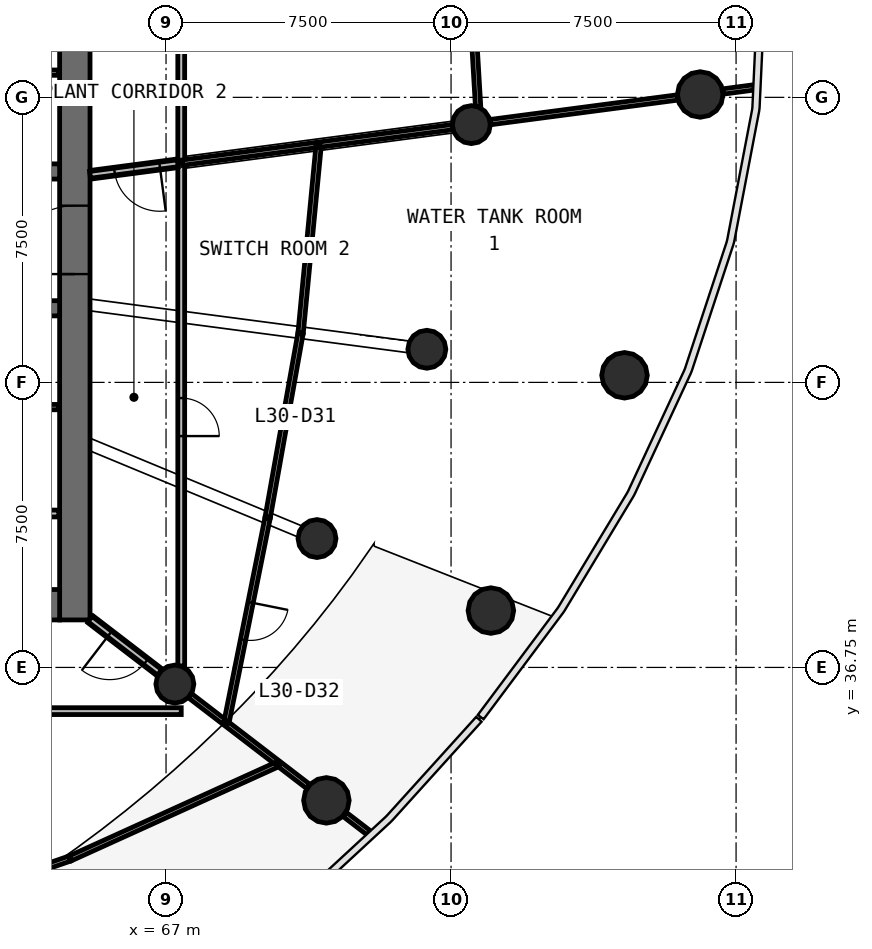
"""IFC4 building model, lengths in metres.
Left out: names, types, materials, properties, quantities, classifications, styles, units other than length and angle.
Written with IfcOpenShell. Run it as: python <this file> out.ifc"""

import sys

from ifc_helpers import new_model, si_unit, direction, frame, frame_2d, origin, origin_2d, place, context, subcontext, project, spatial, rectangle, circle, extrude, source, transform, mapped, element, fill, save


model = new_model("IFC4")
c1 = context("Model", 3, precision=1e-05, world=origin(), true_north=direction((0.0, 1.0)))
c2 = subcontext(c1, "Body", "Model", "MODEL_VIEW")
j1 = project(units=[si_unit("LENGTHUNIT", "METRE"), si_unit("PLANEANGLEUNIT", "RADIAN")], contexts=[c1])
p1 = place(None, origin())
s1 = spatial("IfcSite", under=j1, at=p1, CompositionType="ELEMENT")
p2 = place(p1, origin())
s2 = spatial("IfcBuilding", under=s1, at=p2, CompositionType="ELEMENT")
p3 = place(p2, frame((0.0, 0.0, 129.0)))
s3 = spatial("IfcBuildingStorey", under=s2, at=p3, CompositionType="ELEMENT", Elevation=129.0)
p4 = place(p3, frame((64.6, 38.0, 0.0), z_axis=(0.0, 0.0, 1.0), x_axis=(0.0, 1.0, 0.0)))
e1 = element("IfcWall", 1, at=p4, inside=s3, PredefinedType="SHEAR", context=c2, shape_type="SweptSolid", body=[
    extrude(rectangle(XDim=20.0, YDim=0.8, at=frame_2d((10.0, 0.0))), origin(), (0.0, 0.0, 1.0), 4.1),
])
p5 = place(p4, frame((9.1, 0.0, 0.0)))
e2 = element("IfcOpeningElement", 2, at=p5, cuts=e1, PredefinedType="OPENING", context=c2, shape_type="SweptSolid", body=[
    extrude(rectangle(XDim=1.8, YDim=2.1, at=frame_2d((0.9, 1.05))), frame((0.0, 0.41, 0.0), z_axis=(0.0, -1.0, 0.0), x_axis=(1.0, 0.0, 0.0)), (0.0, 0.0, 1.0), 0.82),
])
p6 = place(p3, frame((39.8, 38.4, 0.0), z_axis=(0.0, 0.0, 1.0), x_axis=(1.0, 0.0, 0.0)))
e3 = element("IfcWall", 3, at=p6, inside=s3, PredefinedType="SHEAR", context=c2, shape_type="SweptSolid", body=[
    extrude(rectangle(XDim=24.4, YDim=0.8, at=frame_2d((12.2, 0.0))), origin(), (0.0, 0.0, 1.0), 4.1),
])
p7 = place(p6, frame((21.65, 0.0, 0.0)))
e4 = element("IfcOpeningElement", 4, at=p7, cuts=e3, PredefinedType="OPENING", context=c2, shape_type="SweptSolid", body=[
    extrude(rectangle(XDim=1.1, YDim=2.1, at=frame_2d((0.55, 1.05))), frame((0.0, 0.41, 0.0), z_axis=(0.0, -1.0, 0.0), x_axis=(1.0, 0.0, 0.0)), (0.0, 0.0, 1.0), 0.82),
])
p8 = place(p6, frame((2.15, 0.0, 0.0)))
e5 = element("IfcOpeningElement", 5, at=p8, cuts=e3, PredefinedType="OPENING", context=c2, shape_type="SweptSolid", body=[
    extrude(rectangle(XDim=1.1, YDim=2.1, at=frame_2d((0.55, 1.05))), frame((0.0, 0.41, 0.0), z_axis=(0.0, -1.0, 0.0), x_axis=(1.0, 0.0, 0.0)), (0.0, 0.0, 1.0), 0.82),
])
p9 = place(p3, frame((39.8, 49.8, 0.0), z_axis=(0.0, 0.0, 1.0), x_axis=(1.0, 0.0, 0.0)))
e6 = element("IfcWall", 6, at=p9, inside=s3, PredefinedType="SHEAR", context=c2, shape_type="SweptSolid", body=[
    extrude(rectangle(XDim=24.4, YDim=0.4, at=frame_2d((12.2, 0.0))), origin(), (0.0, 0.0, 1.0), 4.1),
])
p10 = place(p9, frame((1.1, 0.0, 0.0)))
e7 = element("IfcOpeningElement", 7, at=p10, cuts=e6, PredefinedType="OPENING", context=c2, shape_type="SweptSolid", body=[
    extrude(rectangle(XDim=1.8, YDim=2.4, at=frame_2d((0.9, 1.2))), frame((0.0, 0.21, 0.0), z_axis=(0.0, -1.0, 0.0), x_axis=(1.0, 0.0, 0.0)), (0.0, 0.0, 1.0), 0.42),
])
p11 = place(p9, frame((20.65, 0.0, 0.0)))
e8 = element("IfcOpeningElement", 8, at=p11, cuts=e6, PredefinedType="OPENING", context=c2, shape_type="SweptSolid", body=[
    extrude(rectangle(XDim=0.9, YDim=2.1, at=frame_2d((0.45, 1.05))), frame((0.0, 0.21, 0.0), z_axis=(0.0, -1.0, 0.0), x_axis=(1.0, 0.0, 0.0)), (0.0, 0.0, 1.0), 0.42),
])
p12 = place(p9, frame((11.85, 0.0, 0.0)))
e9 = element("IfcOpeningElement", 9, at=p12, cuts=e6, PredefinedType="OPENING", context=c2, shape_type="SweptSolid", body=[
    extrude(rectangle(XDim=0.9, YDim=2.1, at=frame_2d((0.45, 1.05))), frame((0.0, 0.21, 0.0), z_axis=(0.0, -1.0, 0.0), x_axis=(1.0, 0.0, 0.0)), (0.0, 0.0, 1.0), 0.42),
])
p13 = place(p3, frame((39.8, 46.2, 0.0), z_axis=(0.0, 0.0, 1.0), x_axis=(1.0, 0.0, 0.0)))
e10 = element("IfcWall", 10, at=p13, inside=s3, PredefinedType="SHEAR", context=c2, shape_type="SweptSolid", body=[
    extrude(rectangle(XDim=24.4, YDim=0.4, at=frame_2d((12.2, 0.0))), origin(), (0.0, 0.0, 1.0), 4.1),
])
p14 = place(p13, frame((20.65, 0.0, 0.0)))
e11 = element("IfcOpeningElement", 11, at=p14, cuts=e10, PredefinedType="OPENING", context=c2, shape_type="SweptSolid", body=[
    extrude(rectangle(XDim=0.9, YDim=2.1, at=frame_2d((0.45, 1.05))), frame((0.0, 0.21, 0.0), z_axis=(0.0, -1.0, 0.0), x_axis=(1.0, 0.0, 0.0)), (0.0, 0.0, 1.0), 0.42),
])
p15 = place(p13, frame((22.65, 0.0, 0.0)))
e12 = element("IfcOpeningElement", 12, at=p15, cuts=e10, PredefinedType="OPENING", context=c2, shape_type="SweptSolid", body=[
    extrude(rectangle(XDim=0.9, YDim=2.1, at=frame_2d((0.45, 1.05))), frame((0.0, 0.21, 0.0), z_axis=(0.0, -1.0, 0.0), x_axis=(1.0, 0.0, 0.0)), (0.0, 0.0, 1.0), 0.42),
])
p16 = place(p13, frame((0.85, 0.0, 0.0)))
e13 = element("IfcOpeningElement", 13, at=p16, cuts=e10, PredefinedType="OPENING", context=c2, shape_type="SweptSolid", body=[
    extrude(rectangle(XDim=0.9, YDim=2.1, at=frame_2d((0.45, 1.05))), frame((0.0, 0.21, 0.0), z_axis=(0.0, -1.0, 0.0), x_axis=(1.0, 0.0, 0.0)), (0.0, 0.0, 1.0), 0.42),
])
p17 = place(p13, frame((2.85, 0.0, 0.0)))
e14 = element("IfcOpeningElement", 14, at=p17, cuts=e10, PredefinedType="OPENING", context=c2, shape_type="SweptSolid", body=[
    extrude(rectangle(XDim=0.9, YDim=2.1, at=frame_2d((0.45, 1.05))), frame((0.0, 0.21, 0.0), z_axis=(0.0, -1.0, 0.0), x_axis=(1.0, 0.0, 0.0)), (0.0, 0.0, 1.0), 0.42),
])
p18 = place(p13, frame((11.85, 0.0, 0.0)))
e15 = element("IfcOpeningElement", 15, at=p18, cuts=e10, PredefinedType="OPENING", context=c2, shape_type="SweptSolid", body=[
    extrude(rectangle(XDim=0.9, YDim=2.1, at=frame_2d((0.45, 1.05))), frame((0.0, 0.21, 0.0), z_axis=(0.0, -1.0, 0.0), x_axis=(1.0, 0.0, 0.0)), (0.0, 0.0, 1.0), 0.42),
])
m1 = source(origin(), c2, "Body", "SweptSolid", [
    extrude(circle(Radius=0.6, at=origin_2d()), origin(), (0.0, 0.0, 1.0), 3.78),
])
for number, where, z_axis, x_axis in (
    (16, (81.056, 51.825, 0.0), (0.0, 0.0, 1.0), (1.0, 0.0, 0.0)),
    (17, (71.22, 33.252, 0.0), (0.0, 0.0, 1.0), (1.0, 0.0, 0.0)),
    (18, (75.548, 38.246, 0.0), (0.0, 0.0, 1.0), (1.0, 0.0, 0.0)),
    (19, (79.064, 44.437, 0.0), (0.0, 0.0, 1.0), (1.0, 0.0, 0.0)),
):
    element("IfcColumn", number, at=place(p3, frame(where, z_axis=z_axis, x_axis=x_axis)), inside=s3, PredefinedType="COLUMN", context=c2, shape_type="MappedRepresentation", body=[
        mapped(m1, transform((0.0, 0.0, 0.0), scale=1.0)),
    ])
m2 = source(origin(), c2, "Body", "SweptSolid", [
    extrude(circle(Radius=0.5, at=origin_2d()), origin(), (0.0, 0.0, 1.0), 3.78),
])
for number, where, z_axis, x_axis in (
    (20, (75.034, 51.032, 0.0), (0.0, 0.0, 1.0), (1.0, 0.0, 0.0)),
    (21, (67.232, 36.312, 0.0), (0.0, 0.0, 1.0), (1.0, 0.0, 0.0)),
    (22, (70.972, 40.141, 0.0), (0.0, 0.0, 1.0), (1.0, 0.0, 0.0)),
    (23, (73.863, 45.122, 0.0), (0.0, 0.0, 1.0), (1.0, 0.0, 0.0)),
):
    element("IfcColumn", number, at=place(p3, frame(where, z_axis=z_axis, x_axis=x_axis)), inside=s3, PredefinedType="COLUMN", context=c2, shape_type="MappedRepresentation", body=[
        mapped(m2, transform((0.0, 0.0, 0.0), scale=1.0)),
    ])
p19 = place(p3, frame((67.4, 35.6, 0.0), z_axis=(0.0, 0.0, 1.0), x_axis=(-1.0, 0.0, 0.0)))
e24 = element("IfcWall", 24, at=p19, inside=s3, PredefinedType="PARTITIONING", context=c2, shape_type="SweptSolid", body=[
    extrude(rectangle(XDim=13.767, YDim=0.18, at=frame_2d((6.884, 0.0))), origin(), (0.0, 0.0, 1.0), 2.58),
])
p20 = place(p19, frame((6.317, 0.0, 0.0)))
e25 = element("IfcOpeningElement", 25, at=p20, cuts=e24, PredefinedType="OPENING", context=c2, shape_type="SweptSolid", body=[
    extrude(rectangle(XDim=1.0, YDim=2.1, at=frame_2d((0.5, 1.05))), frame((0.0, 0.1, 0.0), z_axis=(0.0, -1.0, 0.0), x_axis=(1.0, 0.0, 0.0)), (0.0, 0.0, 1.0), 0.2),
])
p21 = place(p3, frame((67.4, 50.027, 0.0), z_axis=(0.0, 0.0, 1.0), x_axis=(0.0, -1.0, 0.0)))
e26 = element("IfcWall", 26, at=p21, inside=s3, PredefinedType="PARTITIONING", context=c2, shape_type="SweptSolid", body=[
    extrude(rectangle(XDim=13.24, YDim=0.18, at=frame_2d((6.62, 0.0))), origin(), (0.0, 0.0, 1.0), 2.58),
])
p22 = place(p21, frame((6.19, 0.0, 0.0)))
e27 = element("IfcOpeningElement", 27, at=p22, cuts=e26, PredefinedType="OPENING", context=c2, shape_type="SweptSolid", body=[
    extrude(rectangle(XDim=1.0, YDim=2.1, at=frame_2d((0.5, 1.05))), frame((0.0, 0.1, 0.0), z_axis=(0.0, -1.0, 0.0), x_axis=(1.0, 0.0, 0.0)), (0.0, 0.0, 1.0), 0.2),
])
p23 = place(p3, frame((67.4, 60.4, 0.0), z_axis=(0.0, 0.0, 1.0), x_axis=(0.0, -1.0, 0.0)))
e28 = element("IfcWall", 28, at=p23, inside=s3, PredefinedType="PARTITIONING", context=c2, shape_type="SweptSolid", body=[
    extrude(rectangle(XDim=10.343, YDim=0.18, at=frame_2d((5.171, 0.0))), origin(), (0.0, 0.0, 1.0), 2.58),
])
p24 = place(p23, frame((4.693, 0.0, 0.0)))
e29 = element("IfcOpeningElement", 29, at=p24, cuts=e28, PredefinedType="OPENING", context=c2, shape_type="SweptSolid", body=[
    extrude(rectangle(XDim=1.0, YDim=2.1, at=frame_2d((0.5, 1.05))), frame((0.0, 0.1, 0.0), z_axis=(0.0, -1.0, 0.0), x_axis=(1.0, 0.0, 0.0)), (0.0, 0.0, 1.0), 0.2),
])
p25 = place(p3, frame((60.23, 40.8, 0.0), z_axis=(0.0, 0.0, 1.0), x_axis=(1.0, 0.0, 0.0)))
e30 = element("IfcWall", 30, at=p25, inside=s3, PredefinedType="PARTITIONING", context=c2, shape_type="SweptSolid", body=[
    extrude(rectangle(XDim=3.95, YDim=0.18, at=frame_2d((1.975, 0.0))), origin(), (0.0, 0.0, 1.0), 3.78),
])
p26 = place(p25, frame((1.6, 0.0, 0.0)))
e31 = element("IfcOpeningElement", 31, at=p26, cuts=e30, PredefinedType="OPENING", context=c2, shape_type="SweptSolid", body=[
    extrude(rectangle(XDim=0.9, YDim=2.1, at=frame_2d((0.45, 1.05))), frame((0.0, 0.1, 0.0), z_axis=(0.0, -1.0, 0.0), x_axis=(1.0, 0.0, 0.0)), (0.0, 0.0, 1.0), 0.2),
])
p27 = place(p3, frame((67.31, 50.016, 0.0), z_axis=(0.0, 0.0, 1.0), x_axis=(-0.991440737811, -0.130557509967, 0.0)))
e32 = element("IfcWall", 32, at=p27, inside=s3, PredefinedType="PARTITIONING", context=c2, shape_type="SweptSolid", body=[
    extrude(rectangle(XDim=2.33, YDim=0.18, at=frame_2d((1.165, 0.0))), origin(), (0.0, 0.0, 1.0), 2.58),
])
p28 = place(p27, frame((0.48, 0.0, 0.0)))
e33 = element("IfcOpeningElement", 33, at=p28, cuts=e32, PredefinedType="OPENING", context=c2, shape_type="SweptSolid", body=[
    extrude(rectangle(XDim=1.2, YDim=2.1, at=frame_2d((0.6, 1.05))), frame((0.0, 0.1, 0.0), z_axis=(0.0, -1.0, 0.0), x_axis=(1.0, 0.0, 0.0)), (0.0, 0.0, 1.0), 0.2),
])
p29 = place(p3, frame((66.832, 36.619, 0.0), z_axis=(0.0, 0.0, 1.0), x_axis=(-0.793393624489, 0.608708926023, 0.0)))
e34 = element("IfcWall", 34, at=p29, inside=s3, PredefinedType="PARTITIONING", context=c2, shape_type="SweptSolid", body=[
    extrude(rectangle(XDim=2.309, YDim=0.18, at=frame_2d((1.155, 0.0))), origin(), (0.0, 0.0, 1.0), 2.58),
])
p30 = place(p29, frame((0.459, 0.0, 0.0)))
e35 = element("IfcOpeningElement", 35, at=p30, cuts=e34, PredefinedType="OPENING", context=c2, shape_type="SweptSolid", body=[
    extrude(rectangle(XDim=1.2, YDim=2.1, at=frame_2d((0.6, 1.05))), frame((0.0, 0.1, 0.0), z_axis=(0.0, -1.0, 0.0), x_axis=(1.0, 0.0, 0.0)), (0.0, 0.0, 1.0), 0.2),
])
p31 = place(p3, frame((64.486, 31.728, 0.0), z_axis=(0.0, 0.0, 1.0), x_axis=(0.910630285698, 0.413222074397, 0.0)))
e36 = element("IfcWall", 36, at=p31, inside=s3, PredefinedType="PARTITIONING", context=c2, shape_type="SweptSolid", body=[
    extrude(rectangle(XDim=6.018, YDim=0.14, at=frame_2d((3.009, 0.0))), origin(), (0.0, 0.0, 1.0), 2.58),
])
p32 = place(p3, frame((74.862, 57.439, 0.0), z_axis=(0.0, 0.0, 1.0), x_axis=(0.058847201185, -0.998267001815, 0.0)))
e37 = element("IfcWall", 37, at=p32, inside=s3, PredefinedType="PARTITIONING", context=c2, shape_type="SweptSolid", body=[
    extrude(rectangle(XDim=5.945, YDim=0.14, at=frame_2d((2.973, 0.0))), origin(), (0.0, 0.0, 1.0), 2.58),
])
p33 = place(p32, frame((2.495, 0.0, 0.0)))
e38 = element("IfcOpeningElement", 38, at=p33, cuts=e37, PredefinedType="OPENING", context=c2, shape_type="SweptSolid", body=[
    extrude(rectangle(XDim=1.0, YDim=2.1, at=frame_2d((0.5, 1.05))), frame((0.0, 0.08, 0.0), z_axis=(0.0, -1.0, 0.0), x_axis=(1.0, 0.0, 0.0)), (0.0, 0.0, 1.0), 0.16),
])
p34 = place(p3, frame((69.672, 40.68, 0.0), z_axis=(0.0, 0.0, 1.0), x_axis=(-0.197248441668, -0.980353534323, 0.0)))
e39 = element("IfcWall", 39, at=p34, inside=s3, PredefinedType="PARTITIONING", context=c2, shape_type="SweptSolid", body=[
    extrude(rectangle(XDim=5.514, YDim=0.14, at=frame_2d((2.757, 0.0))), origin(), (0.0, 0.0, 1.0), 2.58),
])
p35 = place(p34, frame((2.264, 0.0, 0.0)))
e40 = element("IfcOpeningElement", 40, at=p35, cuts=e39, PredefinedType="OPENING", context=c2, shape_type="SweptSolid", body=[
    extrude(rectangle(XDim=1.0, YDim=2.1, at=frame_2d((0.5, 1.05))), frame((0.0, 0.08, 0.0), z_axis=(0.0, -1.0, 0.0), x_axis=(1.0, 0.0, 0.0)), (0.0, 0.0, 1.0), 0.16),
])
p36 = place(p3, frame((59.46, 29.99, 0.0), z_axis=(0.0, 0.0, 1.0), x_axis=(0.945116087861, 0.326734724918, 0.0)))
e41 = element("IfcWall", 41, at=p36, inside=s3, PredefinedType="PARTITIONING", context=c2, shape_type="SweptSolid", body=[
    extrude(rectangle(XDim=5.288, YDim=0.14, at=frame_2d((2.644, 0.0))), origin(), (0.0, 0.0, 1.0), 2.58),
])
p37 = place(p3, frame((70.542, 45.559, 0.0), z_axis=(0.0, 0.0, 1.0), x_axis=(0.095688058523, 0.995411369965, 0.0)))
e42 = element("IfcWall", 42, at=p37, inside=s3, PredefinedType="PARTITIONING", context=c2, shape_type="SweptSolid", body=[
    extrude(rectangle(XDim=4.968, YDim=0.14, at=frame_2d((2.484, 0.0))), origin(), (0.0, 0.0, 1.0), 2.58),
])
p38 = place(p3, frame((75.534, 51.098, 0.0), z_axis=(0.0, 0.0, 1.0), x_axis=(0.991443414541, 0.130537181533, 0.0)))
e43 = element("IfcWall", 43, at=p38, inside=s3, PredefinedType="PARTITIONING", context=c2, shape_type="SweptSolid", body=[
    extrude(rectangle(XDim=4.966, YDim=0.14, at=frame_2d((2.483, 0.0))), origin(), (0.0, 0.0, 1.0), 2.58),
])
p39 = place(p3, frame((69.677, 40.71, 0.0), z_axis=(0.0, 0.0, 1.0), x_axis=(0.175685353507, 0.984446370588, 0.0)))
e44 = element("IfcWall", 44, at=p39, inside=s3, PredefinedType="PARTITIONING", context=c2, shape_type="SweptSolid", body=[
    extrude(rectangle(XDim=4.896, YDim=0.14, at=frame_2d((2.448, 0.0))), origin(), (0.0, 0.0, 1.0), 2.58),
])
p40 = place(p3, frame((64.18, 52.4, 0.0), z_axis=(0.0, 0.0, 1.0), x_axis=(-1.0, 0.0, 0.0)))
e45 = element("IfcWall", 45, at=p40, inside=s3, PredefinedType="PARTITIONING", context=c2, shape_type="SweptSolid", body=[
    extrude(rectangle(XDim=3.95, YDim=0.14, at=frame_2d((1.975, 0.0))), origin(), (0.0, 0.0, 1.0), 2.98),
])
p41 = place(p3, frame((67.43, 50.031, 0.0), z_axis=(0.0, 0.0, 1.0), x_axis=(0.991447734454, 0.130504367157, 0.0)))
e46 = element("IfcWall", 46, at=p41, inside=s3, PredefinedType="PARTITIONING", context=c2, shape_type="SweptSolid", body=[
    extrude(rectangle(XDim=3.547, YDim=0.14, at=frame_2d((1.773, 0.0))), origin(), (0.0, 0.0, 1.0), 2.58),
])
p42 = place(p3, frame((71.047, 50.508, 0.0), z_axis=(0.0, 0.0, 1.0), x_axis=(0.991446023146, 0.130517367377, 0.0)))
e47 = element("IfcWall", 47, at=p42, inside=s3, PredefinedType="PARTITIONING", context=c2, shape_type="SweptSolid", body=[
    extrude(rectangle(XDim=3.517, YDim=0.14, at=frame_2d((1.758, 0.0))), origin(), (0.0, 0.0, 1.0), 2.58),
])
p43 = place(p3, frame((62.23, 43.6, 0.0), z_axis=(0.0, 0.0, 1.0), x_axis=(1.0, 0.0, 0.0)))
e48 = element("IfcWall", 48, at=p43, inside=s3, PredefinedType="PARTITIONING", context=c2, shape_type="SweptSolid", body=[
    extrude(rectangle(XDim=1.95, YDim=0.14, at=frame_2d((0.975, 0.0))), origin(), (0.0, 0.0, 1.0), 2.98),
])
p44 = place(p3, frame((68.608, 35.256, 0.0), z_axis=(0.0, 0.0, 1.0), x_axis=(0.793418526324, -0.608676467498, 0.0)))
e49 = element("IfcWall", 49, at=p44, inside=s3, PredefinedType="PARTITIONING", context=c2, shape_type="SweptSolid", body=[
    extrude(rectangle(XDim=1.632, YDim=0.14, at=frame_2d((0.816, 0.0))), origin(), (0.0, 0.0, 1.0), 2.58),
])
p45 = place(p3, frame((67.633, 36.005, 0.0), z_axis=(0.0, 0.0, 1.0), x_axis=(0.793448671778, -0.60863717045, 0.0)))
e50 = element("IfcWall", 50, at=p45, inside=s3, PredefinedType="PARTITIONING", context=c2, shape_type="SweptSolid", body=[
    extrude(rectangle(XDim=1.122, YDim=0.14, at=frame_2d((0.561, 0.0))), origin(), (0.0, 0.0, 1.0), 2.58),
])
p46 = place(p3, frame((69.99, 34.196, 0.0), z_axis=(0.0, 0.0, 1.0), x_axis=(0.793419442559, -0.60867527317, 0.0)))
e51 = element("IfcWall", 51, at=p46, inside=s3, PredefinedType="PARTITIONING", context=c2, shape_type="SweptSolid", body=[
    extrude(rectangle(XDim=0.946, YDim=0.14, at=frame_2d((0.473, 0.0))), origin(), (0.0, 0.0, 1.0), 2.58),
])
p47 = place(p3, frame((81.656, 51.904, 0.0), z_axis=(0.0, 0.0, 1.0), x_axis=(0.991436143334, 0.130592395224, 0.0)))
e52 = element("IfcWall", 52, at=p47, inside=s3, PredefinedType="PARTITIONING", context=c2, shape_type="SweptSolid", body=[
    extrude(rectangle(XDim=0.824, YDim=0.14, at=frame_2d((0.412, 0.0))), origin(), (0.0, 0.0, 1.0), 2.98),
])
p48 = place(p3, frame((71.699, 32.884, 0.0), z_axis=(0.0, 0.0, 1.0), x_axis=(0.793326455239, -0.608796464689, 0.0)))
e53 = element("IfcWall", 53, at=p48, inside=s3, PredefinedType="PARTITIONING", context=c2, shape_type="SweptSolid", body=[
    extrude(rectangle(XDim=0.801, YDim=0.14, at=frame_2d((0.4, 0.0))), origin(), (0.0, 0.0, 1.0), 2.98),
])
m3 = source(origin(), c2, "Body", "SweptSolid", [
    extrude(rectangle(XDim=1.8, YDim=2.1, at=frame_2d((0.9, 1.05))), frame((0.0, 0.025, 0.0), z_axis=(0.0, -1.0, 0.0), x_axis=(1.0, 0.0, 0.0)), (0.0, 0.0, 1.0), 0.05),
])
p49 = place(p5, origin())
e54 = element("IfcDoor", 54, at=p49, inside=s3, OperationType="SINGLE_SWING_LEFT", PredefinedType="DOOR", context=c2, shape_type="MappedRepresentation", body=[
    mapped(m3, transform((0.0, 0.0, 0.0), scale=1.0)),
])
fill(e2, e54)
m4 = source(origin(), c2, "Body", "SweptSolid", [
    extrude(rectangle(XDim=1.0, YDim=2.1, at=frame_2d((0.5, 1.05))), frame((0.0, 0.025, 0.0), z_axis=(0.0, -1.0, 0.0), x_axis=(1.0, 0.0, 0.0)), (0.0, 0.0, 1.0), 0.05),
])
p50 = place(p22, origin())
e55 = element("IfcDoor", 55, at=p50, inside=s3, OperationType="SINGLE_SWING_RIGHT", PredefinedType="DOOR", context=c2, shape_type="MappedRepresentation", body=[
    mapped(m4, transform((0.0, 0.0, 0.0), scale=1.0)),
])
fill(e27, e55)
p51 = place(p35, origin())
e56 = element("IfcDoor", 56, at=p51, inside=s3, OperationType="SINGLE_SWING_LEFT", PredefinedType="DOOR", context=c2, shape_type="MappedRepresentation", body=[
    mapped(m4, transform((0.0, 0.0, 0.0), scale=1.0)),
])
fill(e40, e56)
m5 = source(origin(), c2, "Body", "SweptSolid", [
    extrude(rectangle(XDim=1.2, YDim=2.1, at=frame_2d((0.6, 1.05))), frame((0.0, 0.025, 0.0), z_axis=(0.0, -1.0, 0.0), x_axis=(1.0, 0.0, 0.0)), (0.0, 0.0, 1.0), 0.05),
])
p52 = place(p30, origin())
e57 = element("IfcDoor", 57, at=p52, inside=s3, OperationType="SINGLE_SWING_RIGHT", PredefinedType="DOOR", context=c2, shape_type="MappedRepresentation", body=[
    mapped(m5, transform((0.0, 0.0, 0.0), scale=1.0)),
])
fill(e35, e57)
p53 = place(p28, origin())
e58 = element("IfcDoor", 58, at=p53, inside=s3, OperationType="SINGLE_SWING_LEFT", PredefinedType="DOOR", context=c2, shape_type="MappedRepresentation", body=[
    mapped(m5, transform((0.0, 0.0, 0.0), scale=1.0)),
])
fill(e33, e58)
save(model, sys.argv[1])
